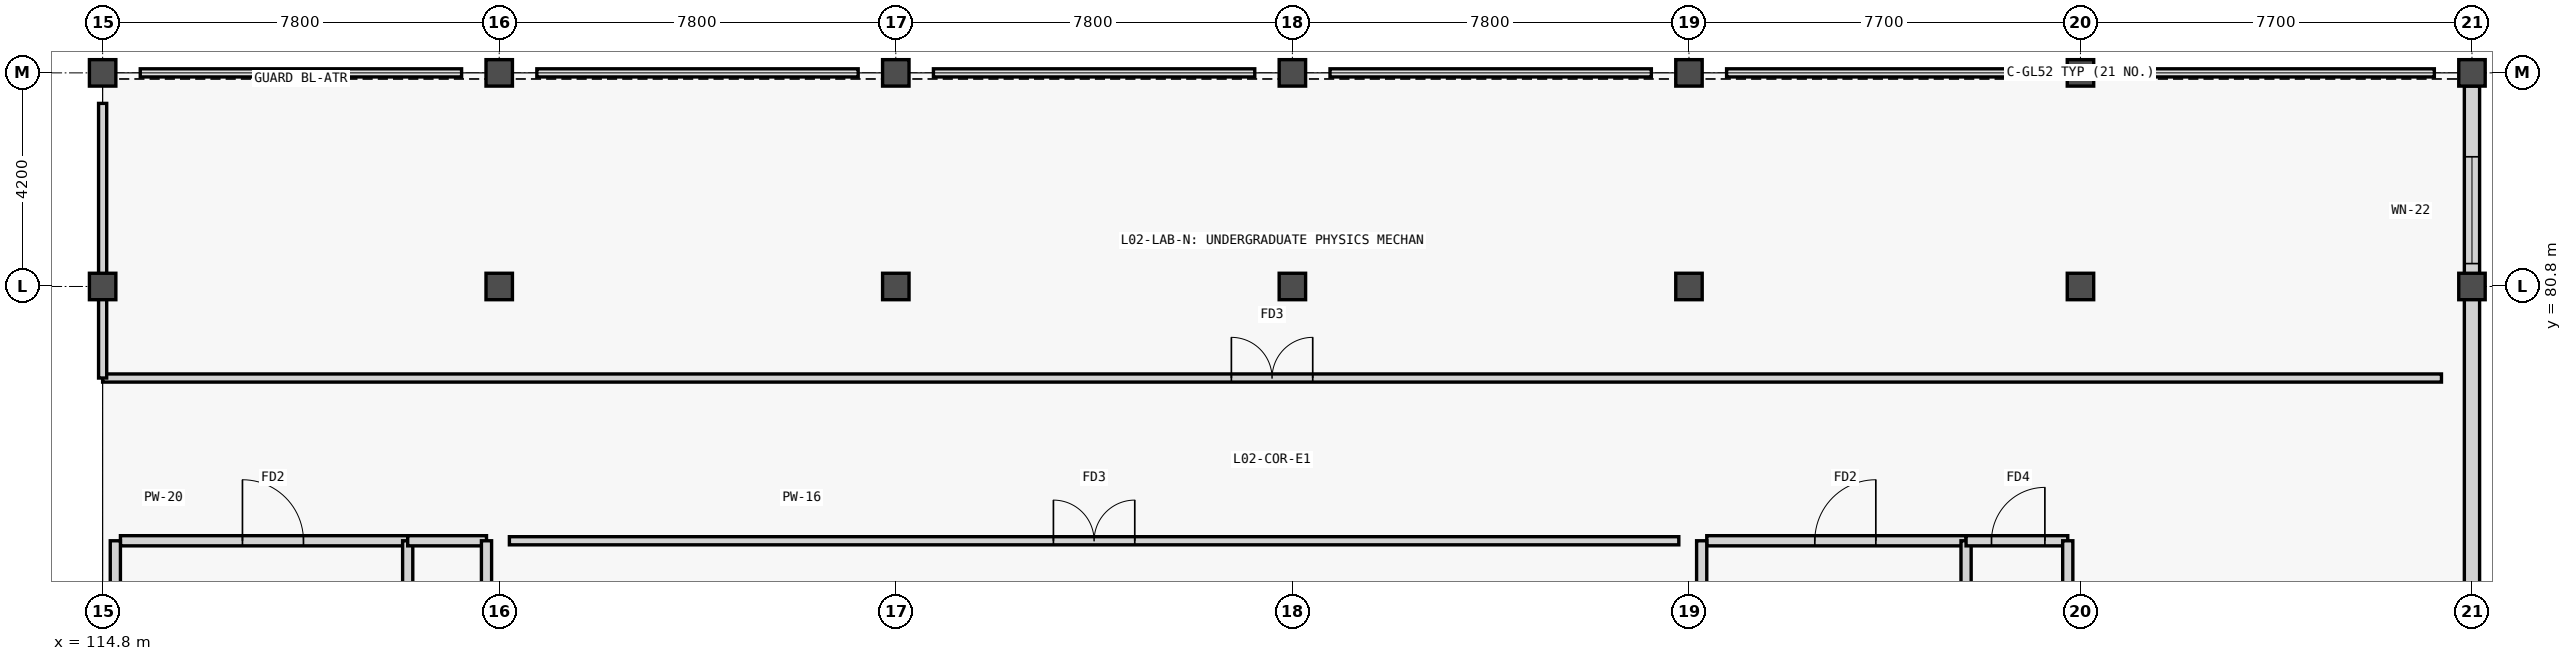
"""IFC4 building model, lengths in metres.
Left out: names, types, materials, properties, quantities, classifications, styles, units other than length and angle.
Written with IfcOpenShell. Run it as: python <this file> out.ifc"""

import sys

from ifc_helpers import new_model, si_unit, direction, frame, frame_2d, origin, origin_2d, place, context, subcontext, project, spatial, rectangle, extrude, element, fill, save


model = new_model("IFC4")
c1 = context("Model", 3, precision=1e-05, world=origin(), true_north=direction((0.0, 1.0)))
c2 = subcontext(c1, "Body", "Model", "MODEL_VIEW")
j1 = project(units=[si_unit("LENGTHUNIT", "METRE"), si_unit("PLANEANGLEUNIT", "RADIAN")], contexts=[c1])
p1 = place(None, origin())
s1 = spatial("IfcSite", under=j1, at=p1, CompositionType="ELEMENT")
p2 = place(p1, origin())
s2 = spatial("IfcBuilding", under=s1, at=p2, CompositionType="ELEMENT")
p3 = place(p2, frame((0.0, 0.0, 10.2)))
s3 = spatial("IfcBuildingStorey", under=s2, at=p3, CompositionType="ELEMENT", Elevation=10.2)
for number, where, z_axis, x_axis in (
    (1, (114.8, 80.8, 0.0), (0.0, 0.0, 1.0), (1.0, 0.0, 0.0)),
    (2, (114.8, 85.0, 0.0), (0.0, 0.0, 1.0), (1.0, 0.0, 0.0)),
    (3, (122.6, 80.8, 0.0), (0.0, 0.0, 1.0), (1.0, 0.0, 0.0)),
    (4, (122.6, 85.0, 0.0), (0.0, 0.0, 1.0), (1.0, 0.0, 0.0)),
    (5, (130.4, 80.8, 0.0), (0.0, 0.0, 1.0), (1.0, 0.0, 0.0)),
    (6, (130.4, 85.0, 0.0), (0.0, 0.0, 1.0), (1.0, 0.0, 0.0)),
    (7, (138.2, 80.8, 0.0), (0.0, 0.0, 1.0), (1.0, 0.0, 0.0)),
    (8, (138.2, 85.0, 0.0), (0.0, 0.0, 1.0), (1.0, 0.0, 0.0)),
    (9, (146.0, 80.8, 0.0), (0.0, 0.0, 1.0), (1.0, 0.0, 0.0)),
    (10, (146.0, 85.0, 0.0), (0.0, 0.0, 1.0), (1.0, 0.0, 0.0)),
    (11, (153.7, 80.8, 0.0), (0.0, 0.0, 1.0), (1.0, 0.0, 0.0)),
    (12, (153.7, 85.0, 0.0), (0.0, 0.0, 1.0), (1.0, 0.0, 0.0)),
    (13, (161.4, 80.8, 0.0), (0.0, 0.0, 1.0), (1.0, 0.0, 0.0)),
    (14, (161.4, 85.0, 0.0), (0.0, 0.0, 1.0), (1.0, 0.0, 0.0)),
):
    element("IfcColumn", number, at=place(p3, frame(where, z_axis=z_axis, x_axis=x_axis)), inside=s3, PredefinedType="COLUMN", context=c2, shape_type="SweptSolid", body=[
        extrude(rectangle(XDim=0.52, YDim=0.52, at=origin_2d()), origin(), (0.0, 0.0, 1.0), 4.2),
    ])
p4 = place(p3, frame((161.4, 84.742, 0.0), z_axis=(0.0, 0.0, 1.0), x_axis=(0.0, -1.0, 0.0)))
e15 = element("IfcWall", 15, at=p4, inside=s3, PredefinedType="SOLIDWALL", context=c2, shape_type="SweptSolid", body=[
    extrude(rectangle(XDim=20.484, YDim=0.3, at=frame_2d((10.242, 0.0))), origin(), (0.0, 0.0, 1.0), 3.36),
])
p5 = place(p4, frame((1.392, 0.0, 0.95)))
e16 = element("IfcOpeningElement", 16, at=p5, cuts=e15, PredefinedType="OPENING", context=c2, shape_type="SweptSolid", body=[
    extrude(rectangle(XDim=2.1, YDim=1.6, at=frame_2d((1.05, 0.8))), frame((0.0, 0.16, 0.0), z_axis=(0.0, -1.0, 0.0), x_axis=(1.0, 0.0, 0.0)), (0.0, 0.0, 1.0), 0.32),
])
p6 = place(p4, frame((14.792, 0.0, 0.95)))
e17 = element("IfcOpeningElement", 17, at=p6, cuts=e15, PredefinedType="OPENING", context=c2, shape_type="SweptSolid", body=[
    extrude(rectangle(XDim=2.4, YDim=1.65, at=frame_2d((1.2, 0.825))), frame((0.0, 0.16, 0.0), z_axis=(0.0, -1.0, 0.0), x_axis=(1.0, 0.0, 0.0)), (0.0, 0.0, 1.0), 0.32),
])
p7 = place(p3, frame((115.15, 75.8, 0.0), z_axis=(0.0, 0.0, 1.0), x_axis=(1.0, 0.0, 0.0)))
e18 = element("IfcWall", 18, at=p7, inside=s3, PredefinedType="PARTITIONING", context=c2, shape_type="SweptSolid", body=[
    extrude(rectangle(XDim=5.65, YDim=0.2, at=frame_2d((2.825, 0.0))), origin(), (0.0, 0.0, 1.0), 3.92),
])
p8 = place(p7, frame((2.4, 0.0, 0.0)))
e19 = element("IfcOpeningElement", 19, at=p8, cuts=e18, PredefinedType="OPENING", context=c2, shape_type="SweptSolid", body=[
    extrude(rectangle(XDim=1.2, YDim=2.2, at=frame_2d((0.6, 1.1))), frame((0.0, 0.11, 0.0), z_axis=(0.0, -1.0, 0.0), x_axis=(1.0, 0.0, 0.0)), (0.0, 0.0, 1.0), 0.22),
])
p9 = place(p3, frame((115.05, 72.4, 0.0), z_axis=(0.0, 0.0, 1.0), x_axis=(0.0, 1.0, 0.0)))
e20 = element("IfcWall", 20, at=p9, inside=s3, PredefinedType="PARTITIONING", context=c2, shape_type="SweptSolid", body=[
    extrude(rectangle(XDim=3.4, YDim=0.2, at=frame_2d((1.7, 0.0))), origin(), (0.0, 0.0, 1.0), 3.36),
])
p10 = place(p3, frame((120.8, 72.4, 0.0), z_axis=(0.0, 0.0, 1.0), x_axis=(0.0, 1.0, 0.0)))
e21 = element("IfcWall", 21, at=p10, inside=s3, PredefinedType="PARTITIONING", context=c2, shape_type="SweptSolid", body=[
    extrude(rectangle(XDim=3.4, YDim=0.2, at=frame_2d((1.7, 0.0))), origin(), (0.0, 0.0, 1.0), 3.92),
])
p11 = place(p10, frame((1.1, 0.0, 0.0)))
e22 = element("IfcOpeningElement", 22, at=p11, cuts=e21, PredefinedType="OPENING", context=c2, shape_type="SweptSolid", body=[
    extrude(rectangle(XDim=1.2, YDim=2.2, at=frame_2d((0.6, 1.1))), frame((0.0, 0.11, 0.0), z_axis=(0.0, -1.0, 0.0), x_axis=(1.0, 0.0, 0.0)), (0.0, 0.0, 1.0), 0.22),
])
p12 = place(p3, frame((120.8, 75.8, 0.0), z_axis=(0.0, 0.0, 1.0), x_axis=(1.0, 0.0, 0.0)))
e23 = element("IfcWall", 23, at=p12, inside=s3, PredefinedType="PARTITIONING", context=c2, shape_type="SweptSolid", body=[
    extrude(rectangle(XDim=1.55, YDim=0.2, at=frame_2d((0.775, 0.0))), origin(), (0.0, 0.0, 1.0), 3.92),
])
p13 = place(p3, frame((122.35, 72.4, 0.0), z_axis=(0.0, 0.0, 1.0), x_axis=(0.0, 1.0, 0.0)))
e24 = element("IfcWall", 24, at=p13, inside=s3, PredefinedType="PARTITIONING", context=c2, shape_type="SweptSolid", body=[
    extrude(rectangle(XDim=3.4, YDim=0.2, at=frame_2d((1.7, 0.0))), origin(), (0.0, 0.0, 1.0), 3.36),
])
p14 = place(p3, frame((146.35, 75.8, 0.0), z_axis=(0.0, 0.0, 1.0), x_axis=(1.0, 0.0, 0.0)))
e25 = element("IfcWall", 25, at=p14, inside=s3, PredefinedType="PARTITIONING", context=c2, shape_type="SweptSolid", body=[
    extrude(rectangle(XDim=5.1, YDim=0.2, at=frame_2d((2.55, 0.0))), origin(), (0.0, 0.0, 1.0), 3.92),
])
p15 = place(p14, frame((2.125, 0.0, 0.0)))
e26 = element("IfcOpeningElement", 26, at=p15, cuts=e25, PredefinedType="OPENING", context=c2, shape_type="SweptSolid", body=[
    extrude(rectangle(XDim=1.2, YDim=2.2, at=frame_2d((0.6, 1.1))), frame((0.0, 0.11, 0.0), z_axis=(0.0, -1.0, 0.0), x_axis=(1.0, 0.0, 0.0)), (0.0, 0.0, 1.0), 0.22),
])
p16 = place(p3, frame((146.25, 72.4, 0.0), z_axis=(0.0, 0.0, 1.0), x_axis=(0.0, 1.0, 0.0)))
e27 = element("IfcWall", 27, at=p16, inside=s3, PredefinedType="PARTITIONING", context=c2, shape_type="SweptSolid", body=[
    extrude(rectangle(XDim=3.4, YDim=0.2, at=frame_2d((1.7, 0.0))), origin(), (0.0, 0.0, 1.0), 3.36),
])
p17 = place(p3, frame((151.45, 72.4, 0.0), z_axis=(0.0, 0.0, 1.0), x_axis=(0.0, 1.0, 0.0)))
e28 = element("IfcWall", 28, at=p17, inside=s3, PredefinedType="PARTITIONING", context=c2, shape_type="SweptSolid", body=[
    extrude(rectangle(XDim=3.4, YDim=0.2, at=frame_2d((1.7, 0.0))), origin(), (0.0, 0.0, 1.0), 3.92),
])
p18 = place(p17, frame((1.1, 0.0, 0.0)))
e29 = element("IfcOpeningElement", 29, at=p18, cuts=e28, PredefinedType="OPENING", context=c2, shape_type="SweptSolid", body=[
    extrude(rectangle(XDim=1.2, YDim=2.2, at=frame_2d((0.6, 1.1))), frame((0.0, 0.11, 0.0), z_axis=(0.0, -1.0, 0.0), x_axis=(1.0, 0.0, 0.0)), (0.0, 0.0, 1.0), 0.22),
])
p19 = place(p3, frame((151.45, 75.8, 0.0), z_axis=(0.0, 0.0, 1.0), x_axis=(1.0, 0.0, 0.0)))
e30 = element("IfcWall", 30, at=p19, inside=s3, PredefinedType="PARTITIONING", context=c2, shape_type="SweptSolid", body=[
    extrude(rectangle(XDim=2.0, YDim=0.2, at=frame_2d((1.0, 0.0))), origin(), (0.0, 0.0, 1.0), 3.92),
])
p20 = place(p19, frame((0.5, 0.0, 0.0)))
e31 = element("IfcOpeningElement", 31, at=p20, cuts=e30, PredefinedType="OPENING", context=c2, shape_type="SweptSolid", body=[
    extrude(rectangle(XDim=1.05, YDim=2.15, at=frame_2d((0.525, 1.075))), frame((0.0, 0.11, 0.0), z_axis=(0.0, -1.0, 0.0), x_axis=(1.0, 0.0, 0.0)), (0.0, 0.0, 1.0), 0.22),
])
p21 = place(p3, frame((153.45, 72.4, 0.0), z_axis=(0.0, 0.0, 1.0), x_axis=(0.0, 1.0, 0.0)))
e32 = element("IfcWall", 32, at=p21, inside=s3, PredefinedType="PARTITIONING", context=c2, shape_type="SweptSolid", body=[
    extrude(rectangle(XDim=3.4, YDim=0.2, at=frame_2d((1.7, 0.0))), origin(), (0.0, 0.0, 1.0), 3.36),
])
p22 = place(p3, frame((122.8, 75.8, 0.0), z_axis=(0.0, 0.0, 1.0), x_axis=(1.0, 0.0, 0.0)))
e33 = element("IfcWall", 33, at=p22, inside=s3, PredefinedType="PARTITIONING", context=c2, shape_type="SweptSolid", body=[
    extrude(rectangle(XDim=23.0, YDim=0.16, at=frame_2d((11.5, 0.0))), origin(), (0.0, 0.0, 1.0), 3.94),
])
p23 = place(p22, frame((10.7, 0.0, 0.0)))
e34 = element("IfcOpeningElement", 34, at=p23, cuts=e33, PredefinedType="OPENING", context=c2, shape_type="SweptSolid", body=[
    extrude(rectangle(XDim=1.6, YDim=2.2, at=frame_2d((0.8, 1.1))), frame((0.0, 0.09, 0.0), z_axis=(0.0, -1.0, 0.0), x_axis=(1.0, 0.0, 0.0)), (0.0, 0.0, 1.0), 0.18),
])
p24 = place(p3, frame((114.8, 79.0, 0.0), z_axis=(0.0, 0.0, 1.0), x_axis=(1.0, 0.0, 0.0)))
e35 = element("IfcWall", 35, at=p24, inside=s3, PredefinedType="PARTITIONING", context=c2, shape_type="SweptSolid", body=[
    extrude(rectangle(XDim=46.0, YDim=0.16, at=frame_2d((23.0, 0.0))), origin(), (0.0, 0.0, 1.0), 3.94),
])
p25 = place(p24, frame((22.2, 0.0, 0.0)))
e36 = element("IfcOpeningElement", 36, at=p25, cuts=e35, PredefinedType="OPENING", context=c2, shape_type="SweptSolid", body=[
    extrude(rectangle(XDim=1.6, YDim=2.2, at=frame_2d((0.8, 1.1))), frame((0.0, 0.09, 0.0), z_axis=(0.0, -1.0, 0.0), x_axis=(1.0, 0.0, 0.0)), (0.0, 0.0, 1.0), 0.18),
])
p26 = place(p3, frame((114.8, 79.0, 0.0), z_axis=(0.0, 0.0, 1.0), x_axis=(0.0, 1.0, 0.0)))
e37 = element("IfcWall", 37, at=p26, inside=s3, PredefinedType="PARTITIONING", context=c2, shape_type="SweptSolid", body=[
    extrude(rectangle(XDim=5.4, YDim=0.16, at=frame_2d((2.7, 0.0))), origin(), (0.0, 0.0, 1.0), 3.36),
])
p27 = place(p5, origin())
e38 = element("IfcWindow", 38, at=p27, inside=s3, PartitioningType="SINGLE_PANEL", PredefinedType="WINDOW", context=c2, shape_type="SweptSolid", body=[
    extrude(rectangle(XDim=2.1, YDim=1.6, at=frame_2d((1.05, 0.8))), frame((0.0, 0.03, 0.0), z_axis=(0.0, -1.0, 0.0), x_axis=(1.0, 0.0, 0.0)), (0.0, 0.0, 1.0), 0.06),
])
fill(e16, e38)
p28 = place(p8, origin())
e39 = element("IfcDoor", 39, at=p28, inside=s3, OperationType="SINGLE_SWING_LEFT", PredefinedType="DOOR", context=c2, shape_type="SweptSolid", body=[
    extrude(rectangle(XDim=1.2, YDim=2.2, at=frame_2d((0.6, 1.1))), frame((0.0, 0.025, 0.0), z_axis=(0.0, -1.0, 0.0), x_axis=(1.0, 0.0, 0.0)), (0.0, 0.0, 1.0), 0.05),
])
fill(e19, e39)
p29 = place(p15, origin())
e40 = element("IfcDoor", 40, at=p29, inside=s3, OperationType="SINGLE_SWING_RIGHT", PredefinedType="DOOR", context=c2, shape_type="SweptSolid", body=[
    extrude(rectangle(XDim=1.2, YDim=2.2, at=frame_2d((0.6, 1.1))), frame((0.0, 0.025, 0.0), z_axis=(0.0, -1.0, 0.0), x_axis=(1.0, 0.0, 0.0)), (0.0, 0.0, 1.0), 0.05),
])
fill(e26, e40)
p30 = place(p20, origin())
e41 = element("IfcDoor", 41, at=p30, inside=s3, OperationType="SINGLE_SWING_RIGHT", PredefinedType="DOOR", context=c2, shape_type="SweptSolid", body=[
    extrude(rectangle(XDim=1.05, YDim=2.15, at=frame_2d((0.525, 1.075))), frame((0.0, 0.025, 0.0), z_axis=(0.0, -1.0, 0.0), x_axis=(1.0, 0.0, 0.0)), (0.0, 0.0, 1.0), 0.05),
])
fill(e31, e41)
p31 = place(p23, origin())
e42 = element("IfcDoor", 42, at=p31, inside=s3, OperationType="DOUBLE_DOOR_SINGLE_SWING", PredefinedType="DOOR", context=c2, shape_type="SweptSolid", body=[
    extrude(rectangle(XDim=1.6, YDim=2.2, at=frame_2d((0.8, 1.1))), frame((0.0, 0.025, 0.0), z_axis=(0.0, -1.0, 0.0), x_axis=(1.0, 0.0, 0.0)), (0.0, 0.0, 1.0), 0.05),
])
fill(e34, e42)
p32 = place(p25, origin())
e43 = element("IfcDoor", 43, at=p32, inside=s3, OperationType="DOUBLE_DOOR_SINGLE_SWING", PredefinedType="DOOR", context=c2, shape_type="SweptSolid", body=[
    extrude(rectangle(XDim=1.6, YDim=2.2, at=frame_2d((0.8, 1.1))), frame((0.0, 0.025, 0.0), z_axis=(0.0, -1.0, 0.0), x_axis=(1.0, 0.0, 0.0)), (0.0, 0.0, 1.0), 0.05),
])
fill(e36, e43)
save(model, sys.argv[1])
